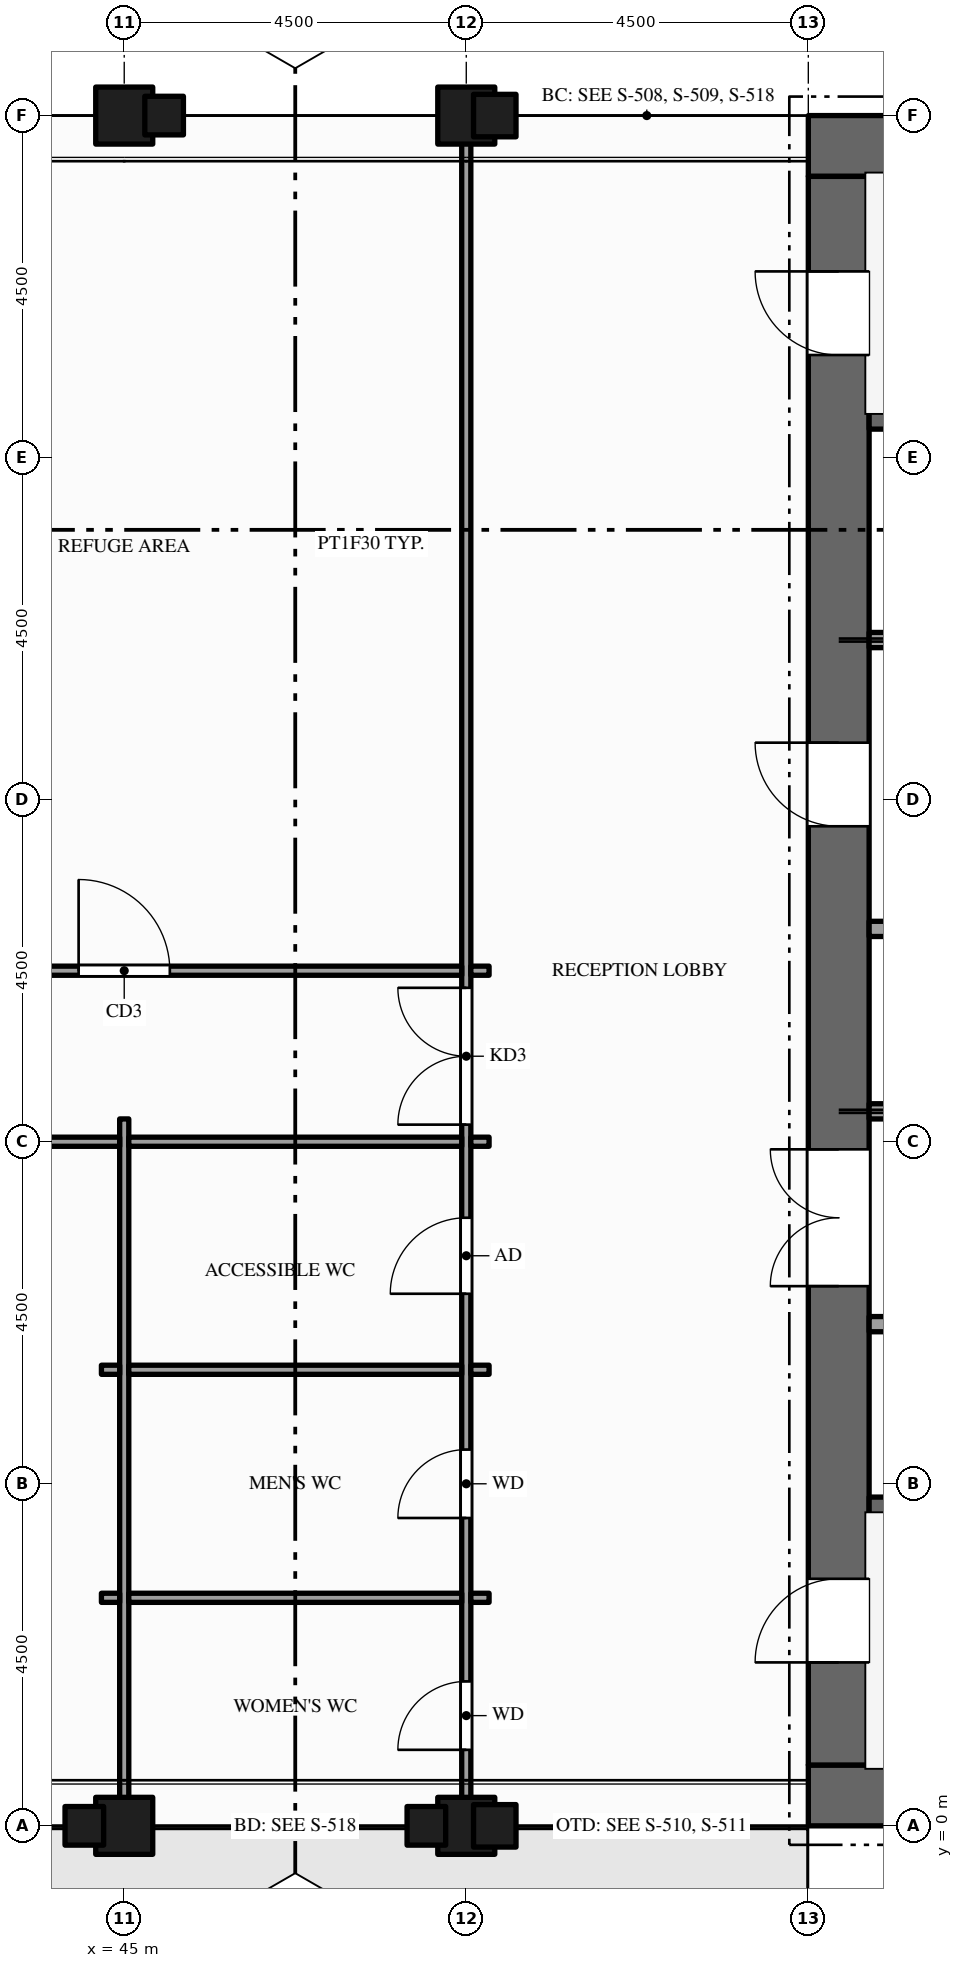
"""IFC4 building model, lengths in metres.
Left out: names, types, materials, properties, quantities, classifications, styles, units other than length and angle.
Written with IfcOpenShell. Run it as: python <this file> out.ifc"""

import sys

from ifc_helpers import new_model, si_unit, direction, frame, frame_2d, origin, origin_2d, place, context, subcontext, project, spatial, rectangle, hollow_rectangle, extrude, element, fill, save


model = new_model("IFC4")
c1 = context("Model", 3, precision=1e-05, world=origin(), true_north=direction((0.0, 1.0)))
c2 = subcontext(c1, "Body", "Model", "MODEL_VIEW")
j1 = project(units=[si_unit("LENGTHUNIT", "METRE"), si_unit("PLANEANGLEUNIT", "RADIAN")], contexts=[c1])
p1 = place(None, origin())
s1 = spatial("IfcSite", under=j1, at=p1, CompositionType="ELEMENT")
p2 = place(p1, origin())
s2 = spatial("IfcBuilding", under=s1, at=p2, CompositionType="ELEMENT")
p3 = place(p2, frame((0.0, 0.0, 243.0)))
s3 = spatial("IfcBuildingStorey", under=s2, at=p3, CompositionType="ELEMENT", Elevation=243.0)
for number, where, z_axis, x_axis in (
    (1, (67.5, 0.4, -0.15), (0.0, 0.0, 1.0), (-1.0, 0.0, 0.0)),
    (2, (54.0, 22.1, -0.15), (0.0, 0.0, 1.0), (1.0, 0.0, 0.0)),
):
    element("IfcWall", number, at=place(p3, frame(where, z_axis=z_axis, x_axis=x_axis)), inside=s3, PredefinedType="SHEAR", context=c2, shape_type="SweptSolid", body=[
        extrude(rectangle(XDim=13.5, YDim=0.8, at=frame_2d((6.75, 0.0))), origin(), (0.0, 0.0, 1.0), 6.0),
    ])
p4 = place(p3, frame((54.4, 0.8, -0.15), z_axis=(0.0, 0.0, 1.0), x_axis=(0.0, 1.0, 0.0)))
e3 = element("IfcWall", 3, at=p4, inside=s3, PredefinedType="SHEAR", context=c2, shape_type="SweptSolid", body=[
    extrude(rectangle(XDim=20.9, YDim=0.8, at=frame_2d((10.45, 0.0))), origin(), (0.0, 0.0, 1.0), 6.0),
])
p5 = place(p4, frame((6.3, 0.0, 0.15)))
e4 = element("IfcOpeningElement", 4, at=p5, cuts=e3, PredefinedType="OPENING", context=c2, shape_type="SweptSolid", body=[
    extrude(rectangle(XDim=1.8, YDim=2.1, at=frame_2d((0.9, 1.05))), frame((0.0, 0.41, 0.0), z_axis=(0.0, -1.0, 0.0), x_axis=(1.0, 0.0, 0.0)), (0.0, 0.0, 1.0), 0.82),
])
p6 = place(p4, frame((12.35, 0.0, 0.15)))
e5 = element("IfcOpeningElement", 5, at=p6, cuts=e3, PredefinedType="OPENING", context=c2, shape_type="SweptSolid", body=[
    extrude(rectangle(XDim=1.1, YDim=2.1, at=frame_2d((0.55, 1.05))), frame((0.0, 0.41, 0.0), z_axis=(0.0, -1.0, 0.0), x_axis=(1.0, 0.0, 0.0)), (0.0, 0.0, 1.0), 0.82),
])
p7 = place(p4, frame((1.35, 0.0, 0.15)))
e6 = element("IfcOpeningElement", 6, at=p7, cuts=e3, PredefinedType="OPENING", context=c2, shape_type="SweptSolid", body=[
    extrude(rectangle(XDim=1.1, YDim=2.1, at=frame_2d((0.55, 1.05))), frame((0.0, 0.41, 0.0), z_axis=(0.0, -1.0, 0.0), x_axis=(1.0, 0.0, 0.0)), (0.0, 0.0, 1.0), 0.82),
])
p8 = place(p4, frame((18.55, 0.0, 0.15)))
e7 = element("IfcOpeningElement", 7, at=p8, cuts=e3, PredefinedType="OPENING", context=c2, shape_type="SweptSolid", body=[
    extrude(rectangle(XDim=1.1, YDim=2.1, at=frame_2d((0.55, 1.05))), frame((0.0, 0.41, 0.0), z_axis=(0.0, -1.0, 0.0), x_axis=(1.0, 0.0, 0.0)), (0.0, 0.0, 1.0), 0.82),
])
p9 = place(p3, frame((45.0, 0.0, -0.3), z_axis=(0.0, 0.0, 1.0), x_axis=(1.0, 0.0, 0.0)))
e8 = element("IfcColumn", 8, at=p9, inside=s3, PredefinedType="COLUMN", context=c2, shape_type="SweptSolid", body=[
    extrude(hollow_rectangle(XDim=0.75, YDim=0.75, WallThickness=0.036, at=origin_2d()), origin(), (0.0, 0.0, 1.0), 6.15),
])
p10 = place(p3, frame((45.0, 22.5, -0.25), z_axis=(0.0, 0.0, 1.0), x_axis=(1.0, 0.0, 0.0)))
e9 = element("IfcColumn", 9, at=p10, inside=s3, PredefinedType="COLUMN", context=c2, shape_type="SweptSolid", body=[
    extrude(hollow_rectangle(XDim=0.75, YDim=0.75, WallThickness=0.036, at=origin_2d()), origin(), (0.0, 0.0, 1.0), 6.1),
])
p11 = place(p3, frame((49.5, 0.0, -0.3), z_axis=(0.0, 0.0, 1.0), x_axis=(1.0, 0.0, 0.0)))
e10 = element("IfcColumn", 10, at=p11, inside=s3, PredefinedType="COLUMN", context=c2, shape_type="SweptSolid", body=[
    extrude(hollow_rectangle(XDim=0.75, YDim=0.75, WallThickness=0.036, at=origin_2d()), origin(), (0.0, 0.0, 1.0), 6.15),
])
p12 = place(p3, frame((49.5, 22.5, -0.25), z_axis=(0.0, 0.0, 1.0), x_axis=(1.0, 0.0, 0.0)))
e11 = element("IfcColumn", 11, at=p12, inside=s3, PredefinedType="COLUMN", context=c2, shape_type="SweptSolid", body=[
    extrude(hollow_rectangle(XDim=0.75, YDim=0.75, WallThickness=0.036, at=origin_2d()), origin(), (0.0, 0.0, 1.0), 6.1),
])
p13 = place(p3, frame((45.0, 0.15, 0.0), z_axis=(0.0, 0.0, 1.0), x_axis=(0.0, 1.0, 0.0)))
e12 = element("IfcWall", 12, at=p13, inside=s3, PredefinedType="PARTITIONING", context=c2, shape_type="SweptSolid", body=[
    extrude(rectangle(XDim=9.15, YDim=0.12, at=frame_2d((4.575, 0.0))), origin(), (0.0, 0.0, 1.0), 4.45),
])
p14 = place(p3, frame((49.5, 0.15, 0.0), z_axis=(0.0, 0.0, 1.0), x_axis=(0.0, 1.0, 0.0)))
e13 = element("IfcWall", 13, at=p14, inside=s3, PredefinedType="PARTITIONING", context=c2, shape_type="SweptSolid", body=[
    extrude(rectangle(XDim=22.2, YDim=0.12, at=frame_2d((11.1, 0.0))), origin(), (0.0, 0.0, 1.0), 4.45),
])
p15 = place(p14, frame((9.075, 0.0, 0.0)))
e14 = element("IfcOpeningElement", 14, at=p15, cuts=e13, PredefinedType="OPENING", context=c2, shape_type="SweptSolid", body=[
    extrude(rectangle(XDim=1.8, YDim=2.1, at=frame_2d((0.9, 1.05))), frame((0.0, 0.07, 0.0), z_axis=(0.0, -1.0, 0.0), x_axis=(1.0, 0.0, 0.0)), (0.0, 0.0, 1.0), 0.14),
])
p16 = place(p14, frame((0.85, 0.0, 0.0)))
e15 = element("IfcOpeningElement", 15, at=p16, cuts=e13, PredefinedType="OPENING", context=c2, shape_type="SweptSolid", body=[
    extrude(rectangle(XDim=0.9, YDim=2.1, at=frame_2d((0.45, 1.05))), frame((0.0, 0.07, 0.0), z_axis=(0.0, -1.0, 0.0), x_axis=(1.0, 0.0, 0.0)), (0.0, 0.0, 1.0), 0.14),
])
p17 = place(p14, frame((3.9, 0.0, 0.0)))
e16 = element("IfcOpeningElement", 16, at=p17, cuts=e13, PredefinedType="OPENING", context=c2, shape_type="SweptSolid", body=[
    extrude(rectangle(XDim=0.9, YDim=2.1, at=frame_2d((0.45, 1.05))), frame((0.0, 0.07, 0.0), z_axis=(0.0, -1.0, 0.0), x_axis=(1.0, 0.0, 0.0)), (0.0, 0.0, 1.0), 0.14),
])
p18 = place(p14, frame((6.85, 0.0, 0.0)))
e17 = element("IfcOpeningElement", 17, at=p18, cuts=e13, PredefinedType="OPENING", context=c2, shape_type="SweptSolid", body=[
    extrude(rectangle(XDim=1.0, YDim=2.1, at=frame_2d((0.5, 1.05))), frame((0.0, 0.07, 0.0), z_axis=(0.0, -1.0, 0.0), x_axis=(1.0, 0.0, 0.0)), (0.0, 0.0, 1.0), 0.14),
])
p19 = place(p3, frame((44.7, 3.0, 0.0), z_axis=(0.0, 0.0, 1.0), x_axis=(1.0, 0.0, 0.0)))
e18 = element("IfcWall", 18, at=p19, inside=s3, PredefinedType="PARTITIONING", context=c2, shape_type="SweptSolid", body=[
    extrude(rectangle(XDim=0.24, YDim=0.12, at=frame_2d((0.12, 0.0))), origin(), (0.0, 0.0, 1.0), 4.87),
])
p20 = place(p3, frame((45.06, 3.0, 0.0), z_axis=(0.0, 0.0, 1.0), x_axis=(1.0, 0.0, 0.0)))
e19 = element("IfcWall", 19, at=p20, inside=s3, PredefinedType="PARTITIONING", context=c2, shape_type="SweptSolid", body=[
    extrude(rectangle(XDim=4.38, YDim=0.12, at=frame_2d((2.19, 0.0))), origin(), (0.0, 0.0, 1.0), 4.87),
])
p21 = place(p3, frame((49.56, 3.0, 0.0), z_axis=(0.0, 0.0, 1.0), x_axis=(1.0, 0.0, 0.0)))
e20 = element("IfcWall", 20, at=p21, inside=s3, PredefinedType="PARTITIONING", context=c2, shape_type="SweptSolid", body=[
    extrude(rectangle(XDim=0.24, YDim=0.12, at=frame_2d((0.12, 0.0))), origin(), (0.0, 0.0, 1.0), 4.87),
])
p22 = place(p3, frame((54.8, 4.2, 0.0), z_axis=(0.0, 0.0, 1.0), x_axis=(1.0, 0.0, 0.0)))
e21 = element("IfcWall", 21, at=p22, inside=s3, PredefinedType="SHEAR", context=c2, shape_type="SweptSolid", body=[
    extrude(rectangle(XDim=6.475, YDim=0.25, at=frame_2d((3.237, 0.0))), origin(), (0.0, 0.0, 1.0), 5.85),
])
p23 = place(p3, frame((44.7, 6.0, 0.0), z_axis=(0.0, 0.0, 1.0), x_axis=(1.0, 0.0, 0.0)))
e22 = element("IfcWall", 22, at=p23, inside=s3, PredefinedType="PARTITIONING", context=c2, shape_type="SweptSolid", body=[
    extrude(rectangle(XDim=0.24, YDim=0.12, at=frame_2d((0.12, 0.0))), origin(), (0.0, 0.0, 1.0), 4.87),
])
p24 = place(p3, frame((45.06, 6.0, 0.0), z_axis=(0.0, 0.0, 1.0), x_axis=(1.0, 0.0, 0.0)))
e23 = element("IfcWall", 23, at=p24, inside=s3, PredefinedType="PARTITIONING", context=c2, shape_type="SweptSolid", body=[
    extrude(rectangle(XDim=4.38, YDim=0.12, at=frame_2d((2.19, 0.0))), origin(), (0.0, 0.0, 1.0), 4.87),
])
p25 = place(p3, frame((49.56, 6.0, 0.0), z_axis=(0.0, 0.0, 1.0), x_axis=(1.0, 0.0, 0.0)))
e24 = element("IfcWall", 24, at=p25, inside=s3, PredefinedType="PARTITIONING", context=c2, shape_type="SweptSolid", body=[
    extrude(rectangle(XDim=0.24, YDim=0.12, at=frame_2d((0.12, 0.0))), origin(), (0.0, 0.0, 1.0), 4.87),
])
p26 = place(p3, frame((54.8, 6.6, 0.0), z_axis=(0.0, 0.0, 1.0), x_axis=(1.0, 0.0, 0.0)))
e25 = element("IfcWall", 25, at=p26, inside=s3, PredefinedType="PARTITIONING", context=c2, shape_type="SweptSolid", body=[
    extrude(rectangle(XDim=6.9, YDim=0.2, at=frame_2d((3.45, 0.0))), origin(), (0.0, 0.0, 1.0), 5.85),
])
p27 = place(p26, frame((3.0, 0.0, 0.0)))
e26 = element("IfcOpeningElement", 26, at=p27, cuts=e25, PredefinedType="OPENING", context=c2, shape_type="SweptSolid", body=[
    extrude(rectangle(XDim=0.9, YDim=2.1, at=frame_2d((0.45, 1.05))), frame((0.0, 0.11, 0.0), z_axis=(0.0, -1.0, 0.0), x_axis=(1.0, 0.0, 0.0)), (0.0, 0.0, 1.0), 0.22),
])
p28 = place(p3, frame((36.06, 9.0, 0.0), z_axis=(0.0, 0.0, 1.0), x_axis=(1.0, 0.0, 0.0)))
e27 = element("IfcWall", 27, at=p28, inside=s3, PredefinedType="PARTITIONING", context=c2, shape_type="SweptSolid", body=[
    extrude(rectangle(XDim=8.88, YDim=0.12, at=frame_2d((4.44, 0.0))), origin(), (0.0, 0.0, 1.0), 4.87),
])
p29 = place(p28, frame((3.84, 0.0, 0.0)))
e28 = element("IfcOpeningElement", 28, at=p29, cuts=e27, PredefinedType="OPENING", context=c2, shape_type="SweptSolid", body=[
    extrude(rectangle(XDim=1.2, YDim=2.1, at=frame_2d((0.6, 1.05))), frame((0.0, 0.07, 0.0), z_axis=(0.0, -1.0, 0.0), x_axis=(1.0, 0.0, 0.0)), (0.0, 0.0, 1.0), 0.14),
])
p30 = place(p3, frame((45.06, 9.0, 0.0), z_axis=(0.0, 0.0, 1.0), x_axis=(1.0, 0.0, 0.0)))
e29 = element("IfcWall", 29, at=p30, inside=s3, PredefinedType="PARTITIONING", context=c2, shape_type="SweptSolid", body=[
    extrude(rectangle(XDim=4.38, YDim=0.12, at=frame_2d((2.19, 0.0))), origin(), (0.0, 0.0, 1.0), 4.87),
])
p31 = place(p3, frame((49.56, 9.0, 0.0), z_axis=(0.0, 0.0, 1.0), x_axis=(1.0, 0.0, 0.0)))
e30 = element("IfcWall", 30, at=p31, inside=s3, PredefinedType="PARTITIONING", context=c2, shape_type="SweptSolid", body=[
    extrude(rectangle(XDim=0.24, YDim=0.12, at=frame_2d((0.12, 0.0))), origin(), (0.0, 0.0, 1.0), 4.87),
])
p32 = place(p3, frame((54.8, 9.4, 0.0), z_axis=(0.0, 0.0, 1.0), x_axis=(1.0, 0.0, 0.0)))
e31 = element("IfcWall", 31, at=p32, inside=s3, PredefinedType="SOLIDWALL", context=c2, shape_type="SweptSolid", body=[
    extrude(rectangle(XDim=2.5, YDim=0.2, at=frame_2d((1.25, 0.0))), origin(), (0.0, 0.0, 1.0), 5.85),
])
p33 = place(p32, frame((0.7, 0.0, 0.012)))
e32 = element("IfcOpeningElement", 32, at=p33, cuts=e31, PredefinedType="OPENING", context=c2, shape_type="SweptSolid", body=[
    extrude(rectangle(XDim=1.1, YDim=2.1, at=frame_2d((0.55, 1.05))), frame((0.0, 0.11, 0.0), z_axis=(0.0, -1.0, 0.0), x_axis=(1.0, 0.0, 0.0)), (0.0, 0.0, 1.0), 0.22),
])
p34 = place(p3, frame((40.56, 11.25, 0.0), z_axis=(0.0, 0.0, 1.0), x_axis=(1.0, 0.0, 0.0)))
e33 = element("IfcWall", 33, at=p34, inside=s3, PredefinedType="PARTITIONING", context=c2, shape_type="SweptSolid", body=[
    extrude(rectangle(XDim=8.88, YDim=0.12, at=frame_2d((4.44, 0.0))), origin(), (0.0, 0.0, 1.0), 4.87),
])
p35 = place(p34, frame((3.84, 0.0, 0.0)))
e34 = element("IfcOpeningElement", 34, at=p35, cuts=e33, PredefinedType="OPENING", context=c2, shape_type="SweptSolid", body=[
    extrude(rectangle(XDim=1.2, YDim=2.1, at=frame_2d((0.6, 1.05))), frame((0.0, 0.07, 0.0), z_axis=(0.0, -1.0, 0.0), x_axis=(1.0, 0.0, 0.0)), (0.0, 0.0, 1.0), 0.14),
])
p36 = place(p3, frame((49.56, 11.25, 0.0), z_axis=(0.0, 0.0, 1.0), x_axis=(1.0, 0.0, 0.0)))
e35 = element("IfcWall", 35, at=p36, inside=s3, PredefinedType="PARTITIONING", context=c2, shape_type="SweptSolid", body=[
    extrude(rectangle(XDim=0.24, YDim=0.12, at=frame_2d((0.12, 0.0))), origin(), (0.0, 0.0, 1.0), 4.87),
])
p37 = place(p3, frame((54.8, 11.8, 0.0), z_axis=(0.0, 0.0, 1.0), x_axis=(1.0, 0.0, 0.0)))
e36 = element("IfcWall", 36, at=p37, inside=s3, PredefinedType="SOLIDWALL", context=c2, shape_type="SweptSolid", body=[
    extrude(rectangle(XDim=2.5, YDim=0.2, at=frame_2d((1.25, 0.0))), origin(), (0.0, 0.0, 1.0), 5.85),
])
p38 = place(p3, frame((54.8, 15.6, 0.0), z_axis=(0.0, 0.0, 1.0), x_axis=(1.0, 0.0, 0.0)))
e37 = element("IfcWall", 37, at=p38, inside=s3, PredefinedType="SOLIDWALL", context=c2, shape_type="SweptSolid", body=[
    extrude(rectangle(XDim=2.5, YDim=0.2, at=frame_2d((1.25, 0.0))), origin(), (0.0, 0.0, 1.0), 5.85),
])
p39 = place(p38, frame((0.7, 0.0, 0.012)))
e38 = element("IfcOpeningElement", 38, at=p39, cuts=e37, PredefinedType="OPENING", context=c2, shape_type="SweptSolid", body=[
    extrude(rectangle(XDim=1.1, YDim=2.1, at=frame_2d((0.55, 1.05))), frame((0.0, 0.11, 0.0), z_axis=(0.0, -1.0, 0.0), x_axis=(1.0, 0.0, 0.0)), (0.0, 0.0, 1.0), 0.22),
])
p40 = place(p3, frame((54.8, 18.5, 0.0), z_axis=(0.0, 0.0, 1.0), x_axis=(1.0, 0.0, 0.0)))
e39 = element("IfcWall", 39, at=p40, inside=s3, PredefinedType="SHEAR", context=c2, shape_type="SweptSolid", body=[
    extrude(rectangle(XDim=6.475, YDim=0.25, at=frame_2d((3.237, 0.0))), origin(), (0.0, 0.0, 1.0), 5.85),
])
p41 = place(p5, origin())
e40 = element("IfcDoor", 40, at=p41, inside=s3, OperationType="DOUBLE_DOOR_SINGLE_SWING", PredefinedType="DOOR", context=c2, shape_type="SweptSolid", body=[
    extrude(rectangle(XDim=1.8, YDim=2.1, at=frame_2d((0.9, 1.05))), frame((0.0, 0.025, 0.0), z_axis=(0.0, -1.0, 0.0), x_axis=(1.0, 0.0, 0.0)), (0.0, 0.0, 1.0), 0.05),
])
fill(e4, e40)
p42 = place(p6, origin())
e41 = element("IfcDoor", 41, at=p42, inside=s3, OperationType="SINGLE_SWING_RIGHT", PredefinedType="DOOR", context=c2, shape_type="SweptSolid", body=[
    extrude(rectangle(XDim=1.1, YDim=2.1, at=frame_2d((0.55, 1.05))), frame((0.0, 0.025, 0.0), z_axis=(0.0, -1.0, 0.0), x_axis=(1.0, 0.0, 0.0)), (0.0, 0.0, 1.0), 0.05),
])
fill(e5, e41)
p43 = place(p7, origin())
e42 = element("IfcDoor", 42, at=p43, inside=s3, OperationType="SINGLE_SWING_LEFT", PredefinedType="DOOR", context=c2, shape_type="SweptSolid", body=[
    extrude(rectangle(XDim=1.1, YDim=2.1, at=frame_2d((0.55, 1.05))), frame((0.0, 0.025, 0.0), z_axis=(0.0, -1.0, 0.0), x_axis=(1.0, 0.0, 0.0)), (0.0, 0.0, 1.0), 0.05),
])
fill(e6, e42)
p44 = place(p8, origin())
e43 = element("IfcDoor", 43, at=p44, inside=s3, OperationType="SINGLE_SWING_RIGHT", PredefinedType="DOOR", context=c2, shape_type="SweptSolid", body=[
    extrude(rectangle(XDim=1.1, YDim=2.1, at=frame_2d((0.55, 1.05))), frame((0.0, 0.025, 0.0), z_axis=(0.0, -1.0, 0.0), x_axis=(1.0, 0.0, 0.0)), (0.0, 0.0, 1.0), 0.05),
])
fill(e7, e43)
p45 = place(p15, origin())
e44 = element("IfcDoor", 44, at=p45, inside=s3, OperationType="DOUBLE_DOOR_SINGLE_SWING", PredefinedType="DOOR", context=c2, shape_type="SweptSolid", body=[
    extrude(rectangle(XDim=1.8, YDim=2.1, at=frame_2d((0.9, 1.05))), frame((0.0, 0.025, 0.0), z_axis=(0.0, -1.0, 0.0), x_axis=(1.0, 0.0, 0.0)), (0.0, 0.0, 1.0), 0.05),
])
fill(e14, e44)
p46 = place(p16, origin())
e45 = element("IfcDoor", 45, at=p46, inside=s3, OperationType="SINGLE_SWING_LEFT", PredefinedType="DOOR", context=c2, shape_type="SweptSolid", body=[
    extrude(rectangle(XDim=0.9, YDim=2.1, at=frame_2d((0.45, 1.05))), frame((0.0, 0.025, 0.0), z_axis=(0.0, -1.0, 0.0), x_axis=(1.0, 0.0, 0.0)), (0.0, 0.0, 1.0), 0.05),
])
fill(e15, e45)
p47 = place(p17, origin())
e46 = element("IfcDoor", 46, at=p47, inside=s3, OperationType="SINGLE_SWING_LEFT", PredefinedType="DOOR", context=c2, shape_type="SweptSolid", body=[
    extrude(rectangle(XDim=0.9, YDim=2.1, at=frame_2d((0.45, 1.05))), frame((0.0, 0.025, 0.0), z_axis=(0.0, -1.0, 0.0), x_axis=(1.0, 0.0, 0.0)), (0.0, 0.0, 1.0), 0.05),
])
fill(e16, e46)
p48 = place(p18, origin())
e47 = element("IfcDoor", 47, at=p48, inside=s3, OperationType="SINGLE_SWING_LEFT", PredefinedType="DOOR", context=c2, shape_type="SweptSolid", body=[
    extrude(rectangle(XDim=1.0, YDim=2.1, at=frame_2d((0.5, 1.05))), frame((0.0, 0.025, 0.0), z_axis=(0.0, -1.0, 0.0), x_axis=(1.0, 0.0, 0.0)), (0.0, 0.0, 1.0), 0.05),
])
fill(e17, e47)
p49 = place(p35, origin())
e48 = element("IfcDoor", 48, at=p49, inside=s3, OperationType="SINGLE_SWING_LEFT", PredefinedType="DOOR", context=c2, shape_type="SweptSolid", body=[
    extrude(rectangle(XDim=1.2, YDim=2.1, at=frame_2d((0.6, 1.05))), frame((0.0, 0.025, 0.0), z_axis=(0.0, -1.0, 0.0), x_axis=(1.0, 0.0, 0.0)), (0.0, 0.0, 1.0), 0.05),
])
fill(e34, e48)
save(model, sys.argv[1])
